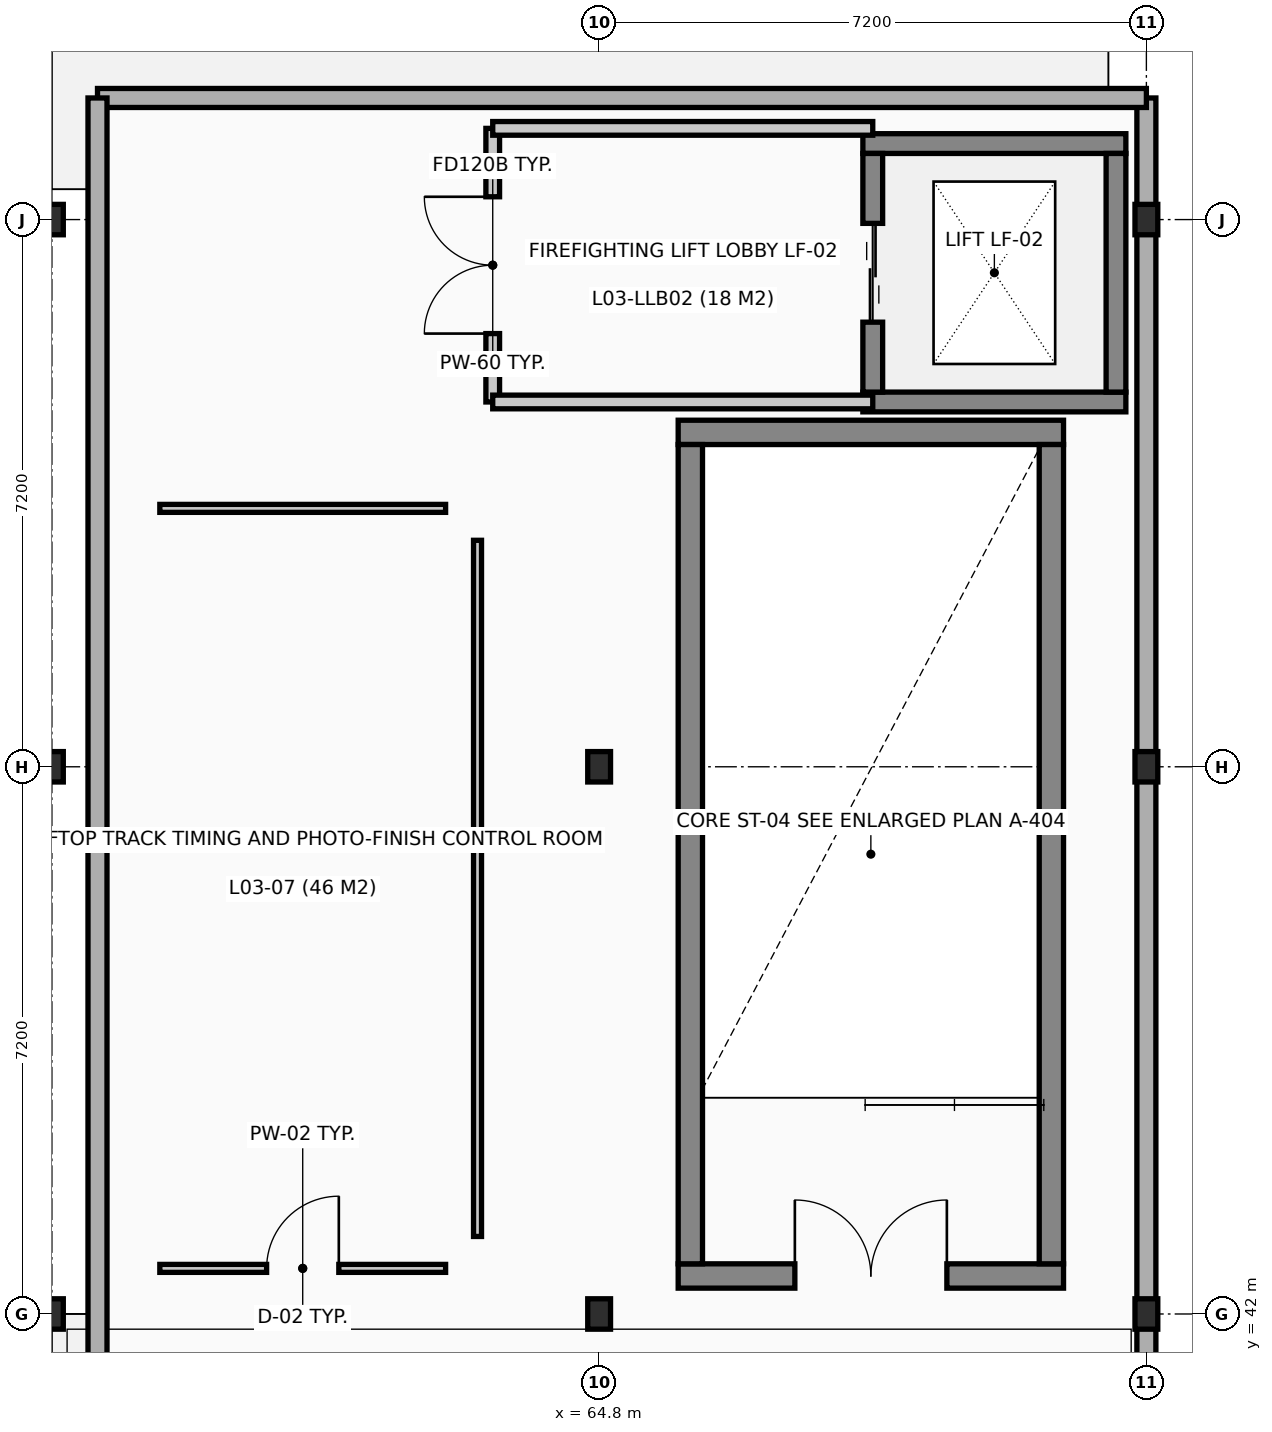
"""IFC4 building model, lengths in metres.
Left out: names, types, materials, properties, quantities, classifications, styles, units other than length and angle.
Written with IfcOpenShell. Run it as: python <this file> out.ifc"""

import sys

from ifc_helpers import new_model, si_unit, direction, frame, frame_2d, origin, origin_2d, place, context, subcontext, project, spatial, rectangle, i_section, extrude, element, fill, save


model = new_model("IFC4")
c1 = context("Model", 3, precision=1e-05, world=origin(), true_north=direction((0.0, 1.0)))
c2 = subcontext(c1, "Body", "Model", "MODEL_VIEW")
j1 = project(units=[si_unit("LENGTHUNIT", "METRE"), si_unit("PLANEANGLEUNIT", "RADIAN")], contexts=[c1])
p1 = place(None, origin())
s1 = spatial("IfcSite", under=j1, at=p1, CompositionType="ELEMENT")
p2 = place(p1, origin())
s2 = spatial("IfcBuilding", under=s1, at=p2, CompositionType="ELEMENT")
p3 = place(p2, frame((0.0, 0.0, 14.4)))
s3 = spatial("IfcBuildingStorey", under=s2, at=p3, CompositionType="ELEMENT", Elevation=14.4)
for number, where, z_axis, x_axis in (
    (1, (57.6, 42.0, 0.0), (0.0, 0.0, 1.0), (1.0, 0.0, 0.0)),
    (2, (57.6, 49.2, 0.0), (0.0, 0.0, 1.0), (1.0, 0.0, 0.0)),
    (3, (57.6, 56.4, 0.0), (0.0, 0.0, 1.0), (1.0, 0.0, 0.0)),
    (4, (64.8, 42.0, 0.0), (0.0, 0.0, 1.0), (1.0, 0.0, 0.0)),
    (5, (64.8, 49.2, 0.0), (0.0, 0.0, 1.0), (1.0, 0.0, 0.0)),
    (6, (72.0, 42.0, 0.0), (0.0, 0.0, 1.0), (1.0, 0.0, 0.0)),
    (7, (72.0, 49.2, 0.0), (0.0, 0.0, 1.0), (1.0, 0.0, 0.0)),
    (8, (72.0, 56.4, 0.0), (0.0, 0.0, 1.0), (1.0, 0.0, 0.0)),
):
    element("IfcColumn", number, at=place(p3, frame(where, z_axis=z_axis, x_axis=x_axis)), inside=s3, PredefinedType="COLUMN", context=c2, shape_type="SweptSolid", body=[
        extrude(i_section(OverallWidth=0.3, OverallDepth=0.4, WebThickness=0.013, FlangeThickness=0.024, at=origin_2d()), origin(), (0.0, 0.0, 1.0), 4.8),
    ])
p4 = place(p3, frame((72.0, 35.004, 0.0), z_axis=(0.0, 0.0, 1.0), x_axis=(0.0, 1.0, 0.0)))
e9 = element("IfcWall", 9, at=p4, inside=s3, PredefinedType="SOLIDWALL", context=c2, shape_type="SweptSolid", body=[
    extrude(rectangle(XDim=22.996, YDim=0.25, at=frame_2d((11.498, 0.0))), origin(), (0.0, 0.0, 1.0), 3.15),
])
p5 = place(p3, frame((58.2, 58.0, 0.0), z_axis=(0.0, 0.0, 1.0), x_axis=(1.0, 0.0, 0.0)))
e10 = element("IfcWall", 10, at=p5, inside=s3, PredefinedType="SOLIDWALL", context=c2, shape_type="SweptSolid", body=[
    extrude(rectangle(XDim=13.8, YDim=0.25, at=frame_2d((6.9, 0.0))), origin(), (0.0, 0.0, 1.0), 3.15),
])
p6 = place(p3, frame((58.2, 34.8, 0.0), z_axis=(0.0, 0.0, 1.0), x_axis=(0.0, 1.0, 0.0)))
e11 = element("IfcWall", 11, at=p6, inside=s3, PredefinedType="SOLIDWALL", context=c2, shape_type="SweptSolid", body=[
    extrude(rectangle(XDim=23.2, YDim=0.25, at=frame_2d((11.6, 0.0))), origin(), (0.0, 0.0, 1.0), 3.15),
])
p7 = place(p3, frame((65.84, 42.5, 0.0), z_axis=(0.0, 0.0, 1.0), x_axis=(1.0, 0.0, 0.0)))
e12 = element("IfcWall", 12, at=p7, inside=s3, PredefinedType="SHEAR", context=c2, shape_type="SweptSolid", body=[
    extrude(rectangle(XDim=5.07, YDim=0.32, at=frame_2d((2.535, 0.0))), origin(), (0.0, 0.0, 1.0), 4.0),
])
p8 = place(p7, frame((1.535, 0.0, 0.0)))
e13 = element("IfcOpeningElement", 13, at=p8, cuts=e12, PredefinedType="OPENING", context=c2, shape_type="SweptSolid", body=[
    extrude(rectangle(XDim=2.0, YDim=2.15, at=frame_2d((1.0, 1.075))), frame((0.0, 0.17, 0.0), z_axis=(0.0, -1.0, 0.0), x_axis=(1.0, 0.0, 0.0)), (0.0, 0.0, 1.0), 0.34),
])
p9 = place(p3, frame((65.84, 53.6, 0.0), z_axis=(0.0, 0.0, 1.0), x_axis=(1.0, 0.0, 0.0)))
e14 = element("IfcWall", 14, at=p9, inside=s3, PredefinedType="SHEAR", context=c2, shape_type="SweptSolid", body=[
    extrude(rectangle(XDim=5.07, YDim=0.32, at=frame_2d((2.535, 0.0))), origin(), (0.0, 0.0, 1.0), 4.0),
])
for number, where, z_axis, x_axis in (
    (15, (66.0, 42.66, 0.0), (0.0, 0.0, 1.0), (0.0, 1.0, 0.0)),
    (16, (70.75, 42.66, 0.0), (0.0, 0.0, 1.0), (0.0, 1.0, 0.0)),
):
    element("IfcWall", number, at=place(p3, frame(where, z_axis=z_axis, x_axis=x_axis)), inside=s3, PredefinedType="SHEAR", context=c2, shape_type="SweptSolid", body=[
        extrude(rectangle(XDim=10.78, YDim=0.32, at=frame_2d((5.39, 0.0))), origin(), (0.0, 0.0, 1.0), 4.0),
    ])
for number, where, z_axis, x_axis in (
    (17, (68.27, 54.0, 0.0), (0.0, 0.0, 1.0), (1.0, 0.0, 0.0)),
    (18, (68.27, 57.4, 0.0), (0.0, 0.0, 1.0), (1.0, 0.0, 0.0)),
):
    element("IfcWall", number, at=place(p3, frame(where, z_axis=z_axis, x_axis=x_axis)), inside=s3, PredefinedType="SHEAR", context=c2, shape_type="SweptSolid", body=[
        extrude(rectangle(XDim=3.46, YDim=0.26, at=frame_2d((1.73, 0.0))), origin(), (0.0, 0.0, 1.0), 4.0),
    ])
p10 = place(p3, frame((68.4, 54.13, 0.0), z_axis=(0.0, 0.0, 1.0), x_axis=(0.0, 1.0, 0.0)))
e19 = element("IfcWall", 19, at=p10, inside=s3, PredefinedType="SHEAR", context=c2, shape_type="SweptSolid", body=[
    extrude(rectangle(XDim=3.14, YDim=0.26, at=frame_2d((1.57, 0.0))), origin(), (0.0, 0.0, 1.0), 4.0),
])
p11 = place(p10, frame((0.92, 0.0, 0.0)))
e20 = element("IfcOpeningElement", 20, at=p11, cuts=e19, PredefinedType="OPENING", context=c2, shape_type="SweptSolid", body=[
    extrude(rectangle(XDim=1.3, YDim=2.2, at=frame_2d((0.65, 1.1))), frame((0.0, 0.14, 0.0), z_axis=(0.0, -1.0, 0.0), x_axis=(1.0, 0.0, 0.0)), (0.0, 0.0, 1.0), 0.28),
])
p12 = place(p3, frame((71.6, 54.13, 0.0), z_axis=(0.0, 0.0, 1.0), x_axis=(0.0, 1.0, 0.0)))
e21 = element("IfcWall", 21, at=p12, inside=s3, PredefinedType="SHEAR", context=c2, shape_type="SweptSolid", body=[
    extrude(rectangle(XDim=3.14, YDim=0.26, at=frame_2d((1.57, 0.0))), origin(), (0.0, 0.0, 1.0), 4.0),
])
p13 = place(p3, frame((63.4, 54.0, 0.0), z_axis=(0.0, 0.0, 1.0), x_axis=(0.0, 1.0, 0.0)))
e22 = element("IfcWall", 22, at=p13, inside=s3, PredefinedType="PARTITIONING", context=c2, shape_type="SweptSolid", body=[
    extrude(rectangle(XDim=3.6, YDim=0.18, at=frame_2d((1.8, 0.0))), origin(), (0.0, 0.0, 1.0), 3.985),
])
p14 = place(p13, frame((0.9, 0.0, 0.0)))
e23 = element("IfcOpeningElement", 23, at=p14, cuts=e22, PredefinedType="OPENING", context=c2, shape_type="SweptSolid", body=[
    extrude(rectangle(XDim=1.8, YDim=2.15, at=frame_2d((0.9, 1.075))), frame((0.0, 0.1, 0.0), z_axis=(0.0, -1.0, 0.0), x_axis=(1.0, 0.0, 0.0)), (0.0, 0.0, 1.0), 0.2),
])
for number, where, z_axis, x_axis in (
    (24, (63.4, 54.0, 0.0), (0.0, 0.0, 1.0), (1.0, 0.0, 0.0)),
    (25, (63.4, 57.6, 0.0), (0.0, 0.0, 1.0), (1.0, 0.0, 0.0)),
):
    element("IfcWall", number, at=place(p3, frame(where, z_axis=z_axis, x_axis=x_axis)), inside=s3, PredefinedType="PARTITIONING", context=c2, shape_type="SweptSolid", body=[
        extrude(rectangle(XDim=5.0, YDim=0.18, at=frame_2d((2.5, 0.0))), origin(), (0.0, 0.0, 1.0), 3.985),
    ])
p15 = place(p3, frame((59.02, 42.6, 0.0), z_axis=(0.0, 0.0, 1.0), x_axis=(1.0, 0.0, 0.0)))
e26 = element("IfcWall", 26, at=p15, inside=s3, PredefinedType="PARTITIONING", context=c2, shape_type="SweptSolid", body=[
    extrude(rectangle(XDim=3.76, YDim=0.105, at=frame_2d((1.88, 0.0))), origin(), (0.0, 0.0, 1.0), 3.985),
])
p16 = place(p15, frame((1.405, 0.0, 0.0)))
e27 = element("IfcOpeningElement", 27, at=p16, cuts=e26, PredefinedType="OPENING", context=c2, shape_type="SweptSolid", body=[
    extrude(rectangle(XDim=0.95, YDim=2.1, at=frame_2d((0.475, 1.05))), frame((0.0, 0.062, 0.0), z_axis=(0.0, -1.0, 0.0), x_axis=(1.0, 0.0, 0.0)), (0.0, 0.0, 1.0), 0.125),
])
p17 = place(p3, frame((59.02, 52.6, 0.0), z_axis=(0.0, 0.0, 1.0), x_axis=(1.0, 0.0, 0.0)))
e28 = element("IfcWall", 28, at=p17, inside=s3, PredefinedType="PARTITIONING", context=c2, shape_type="SweptSolid", body=[
    extrude(rectangle(XDim=3.76, YDim=0.105, at=frame_2d((1.88, 0.0))), origin(), (0.0, 0.0, 1.0), 3.985),
])
p18 = place(p3, frame((63.2, 43.02, 0.0), z_axis=(0.0, 0.0, 1.0), x_axis=(0.0, 1.0, 0.0)))
e29 = element("IfcWall", 29, at=p18, inside=s3, PredefinedType="PARTITIONING", context=c2, shape_type="SweptSolid", body=[
    extrude(rectangle(XDim=9.16, YDim=0.105, at=frame_2d((4.58, 0.0))), origin(), (0.0, 0.0, 1.0), 3.985),
])
p19 = place(p8, origin())
e30 = element("IfcDoor", 30, at=p19, inside=s3, OperationType="DOUBLE_DOOR_SINGLE_SWING", PredefinedType="DOOR", context=c2, shape_type="SweptSolid", body=[
    extrude(rectangle(XDim=2.0, YDim=2.15, at=frame_2d((1.0, 1.075))), frame((0.0, 0.025, 0.0), z_axis=(0.0, -1.0, 0.0), x_axis=(1.0, 0.0, 0.0)), (0.0, 0.0, 1.0), 0.05),
])
fill(e13, e30)
p20 = place(p11, origin())
e31 = element("IfcDoor", 31, at=p20, inside=s3, OperationType="DOUBLE_DOOR_SLIDING", PredefinedType="DOOR", context=c2, shape_type="SweptSolid", body=[
    extrude(rectangle(XDim=1.3, YDim=2.2, at=frame_2d((0.65, 1.1))), frame((0.0, 0.025, 0.0), z_axis=(0.0, -1.0, 0.0), x_axis=(1.0, 0.0, 0.0)), (0.0, 0.0, 1.0), 0.05),
])
fill(e20, e31)
p21 = place(p14, origin())
e32 = element("IfcDoor", 32, at=p21, inside=s3, OperationType="DOUBLE_DOOR_SINGLE_SWING", PredefinedType="DOOR", context=c2, shape_type="SweptSolid", body=[
    extrude(rectangle(XDim=1.8, YDim=2.15, at=frame_2d((0.9, 1.075))), frame((0.0, 0.025, 0.0), z_axis=(0.0, -1.0, 0.0), x_axis=(1.0, 0.0, 0.0)), (0.0, 0.0, 1.0), 0.05),
])
fill(e23, e32)
p22 = place(p16, origin())
e33 = element("IfcDoor", 33, at=p22, inside=s3, OperationType="SINGLE_SWING_RIGHT", PredefinedType="DOOR", context=c2, shape_type="SweptSolid", body=[
    extrude(rectangle(XDim=0.95, YDim=2.1, at=frame_2d((0.475, 1.05))), frame((0.0, 0.025, 0.0), z_axis=(0.0, -1.0, 0.0), x_axis=(1.0, 0.0, 0.0)), (0.0, 0.0, 1.0), 0.05),
])
fill(e27, e33)
save(model, sys.argv[1])
